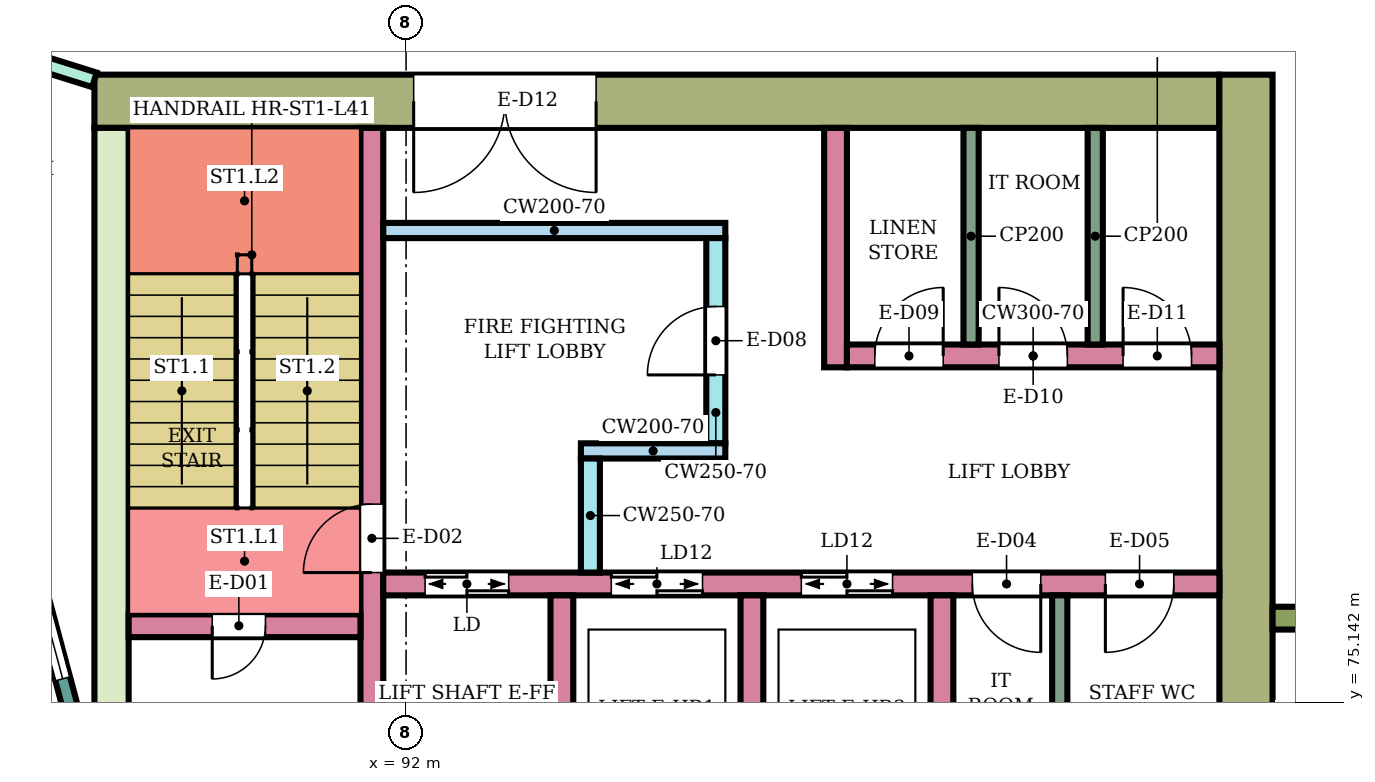
"""IFC4 building model, lengths in metres.
Left out: names, types, materials, properties, quantities, classifications, styles, units other than length and angle.
Written with IfcOpenShell. Run it as: python <this file> out.ifc"""

import sys

from ifc_helpers import new_model, si_unit, direction, frame, frame_2d, origin, place, context, subcontext, project, spatial, rectangle, extrude, element, fill, save


model = new_model("IFC4")
c1 = context("Model", 3, precision=1e-05, world=origin(), true_north=direction((0.0, 1.0)))
c2 = subcontext(c1, "Body", "Model", "MODEL_VIEW")
j1 = project(units=[si_unit("LENGTHUNIT", "METRE"), si_unit("PLANEANGLEUNIT", "RADIAN")], contexts=[c1])
p1 = place(None, origin())
s1 = spatial("IfcSite", under=j1, at=p1, CompositionType="ELEMENT")
p2 = place(p1, origin())
s2 = spatial("IfcBuilding", under=s1, at=p2, CompositionType="ELEMENT")
p3 = place(p2, frame((0.0, 0.0, 178.2)))
s3 = spatial("IfcBuildingStorey", under=s2, at=p3, CompositionType="ELEMENT", Elevation=178.2)
p4 = place(p3, frame((87.9, 83.05, 0.0), z_axis=(0.0, 0.0, 1.0), x_axis=(1.0, 0.0, 0.0)))
e1 = element("IfcWall", 1, at=p4, inside=s3, PredefinedType="SHEAR", context=c2, shape_type="SweptSolid", body=[
    extrude(rectangle(XDim=14.8, YDim=0.7, at=frame_2d((7.4, 0.0))), origin(), (0.0, 0.0, 1.0), 3.78),
])
p5 = place(p4, frame((4.2, 0.0, 0.0)))
e2 = element("IfcOpeningElement", 2, at=p5, cuts=e1, PredefinedType="OPENING", context=c2, shape_type="SweptSolid", body=[
    extrude(rectangle(XDim=2.4, YDim=2.4, at=frame_2d((1.2, 1.2))), frame((0.0, 0.36, 0.0), z_axis=(0.0, -1.0, 0.0), x_axis=(1.0, 0.0, 0.0)), (0.0, 0.0, 1.0), 0.72),
])
p6 = place(p3, frame((88.125, 75.0, 0.0), z_axis=(0.0, 0.0, 1.0), x_axis=(0.0, 1.0, 0.0)))
e3 = element("IfcWall", 3, at=p6, inside=s3, PredefinedType="SHEAR", context=c2, shape_type="SweptSolid", body=[
    extrude(rectangle(XDim=7.7, YDim=0.45, at=frame_2d((3.85, 0.0))), origin(), (0.0, 0.0, 1.0), 3.78),
])
p7 = place(p3, frame((103.05, 66.6, 0.0), z_axis=(0.0, 0.0, 1.0), x_axis=(0.0, 1.0, 0.0)))
e4 = element("IfcWall", 4, at=p7, inside=s3, PredefinedType="SHEAR", context=c2, shape_type="SweptSolid", body=[
    extrude(rectangle(XDim=16.8, YDim=0.7, at=frame_2d((8.4, 0.0))), origin(), (0.0, 0.0, 1.0), 3.78),
])
p8 = place(p3, frame((91.55, 75.0, 0.0), z_axis=(0.0, 0.0, 1.0), x_axis=(0.0, 1.0, 0.0)))
e5 = element("IfcWall", 5, at=p8, inside=s3, PredefinedType="SHEAR", context=c2, shape_type="SweptSolid", body=[
    extrude(rectangle(XDim=7.7, YDim=0.3, at=frame_2d((3.85, 0.0))), origin(), (0.0, 0.0, 1.0), 3.78),
])
p9 = place(p8, frame((1.85, 0.0, 0.0)))
e6 = element("IfcOpeningElement", 6, at=p9, cuts=e5, PredefinedType="OPENING", context=c2, shape_type="SweptSolid", body=[
    extrude(rectangle(XDim=0.9, YDim=2.1, at=frame_2d((0.45, 1.05))), frame((0.0, 0.16, 0.0), z_axis=(0.0, -1.0, 0.0), x_axis=(1.0, 0.0, 0.0)), (0.0, 0.0, 1.0), 0.32),
])
p10 = place(p3, frame((88.35, 76.15, 0.0), z_axis=(0.0, 0.0, 1.0), x_axis=(1.0, 0.0, 0.0)))
e7 = element("IfcWall", 7, at=p10, inside=s3, PredefinedType="SHEAR", context=c2, shape_type="SweptSolid", body=[
    extrude(rectangle(XDim=3.05, YDim=0.3, at=frame_2d((1.525, 0.0))), origin(), (0.0, 0.0, 1.0), 3.78),
])
p11 = place(p10, frame((1.1, 0.0, 0.0)))
e8 = element("IfcOpeningElement", 8, at=p11, cuts=e7, PredefinedType="OPENING", context=c2, shape_type="SweptSolid", body=[
    extrude(rectangle(XDim=0.7, YDim=2.0, at=frame_2d((0.35, 1.0))), frame((0.0, 0.16, 0.0), z_axis=(0.0, -1.0, 0.0), x_axis=(1.0, 0.0, 0.0)), (0.0, 0.0, 1.0), 0.32),
])
p12 = place(p3, frame((91.7, 76.7, 0.0), z_axis=(0.0, 0.0, 1.0), x_axis=(1.0, 0.0, 0.0)))
e9 = element("IfcWall", 9, at=p12, inside=s3, PredefinedType="SHEAR", context=c2, shape_type="SweptSolid", body=[
    extrude(rectangle(XDim=11.0, YDim=0.3, at=frame_2d((5.5, 0.0))), origin(), (0.0, 0.0, 1.0), 3.78),
])
p13 = place(p12, frame((0.55, 0.0, 0.0)))
e10 = element("IfcOpeningElement", 10, at=p13, cuts=e9, PredefinedType="OPENING", context=c2, shape_type="SweptSolid", body=[
    extrude(rectangle(XDim=1.1, YDim=2.1, at=frame_2d((0.55, 1.05))), frame((0.0, 0.16, 0.0), z_axis=(0.0, -1.0, 0.0), x_axis=(1.0, 0.0, 0.0)), (0.0, 0.0, 1.0), 0.32),
])
p14 = place(p12, frame((3.0, 0.0, 0.0)))
e11 = element("IfcOpeningElement", 11, at=p14, cuts=e9, PredefinedType="OPENING", context=c2, shape_type="SweptSolid", body=[
    extrude(rectangle(XDim=1.2, YDim=2.1, at=frame_2d((0.6, 1.05))), frame((0.0, 0.16, 0.0), z_axis=(0.0, -1.0, 0.0), x_axis=(1.0, 0.0, 0.0)), (0.0, 0.0, 1.0), 0.32),
])
p15 = place(p12, frame((5.5, 0.0, 0.0)))
e12 = element("IfcOpeningElement", 12, at=p15, cuts=e9, PredefinedType="OPENING", context=c2, shape_type="SweptSolid", body=[
    extrude(rectangle(XDim=1.2, YDim=2.1, at=frame_2d((0.6, 1.05))), frame((0.0, 0.16, 0.0), z_axis=(0.0, -1.0, 0.0), x_axis=(1.0, 0.0, 0.0)), (0.0, 0.0, 1.0), 0.32),
])
p16 = place(p12, frame((7.75, 0.0, 0.0)))
e13 = element("IfcOpeningElement", 13, at=p16, cuts=e9, PredefinedType="OPENING", context=c2, shape_type="SweptSolid", body=[
    extrude(rectangle(XDim=0.9, YDim=2.1, at=frame_2d((0.45, 1.05))), frame((0.0, 0.16, 0.0), z_axis=(0.0, -1.0, 0.0), x_axis=(1.0, 0.0, 0.0)), (0.0, 0.0, 1.0), 0.32),
])
p17 = place(p12, frame((9.5, 0.0, 0.0)))
e14 = element("IfcOpeningElement", 14, at=p17, cuts=e9, PredefinedType="OPENING", context=c2, shape_type="SweptSolid", body=[
    extrude(rectangle(XDim=0.9, YDim=2.1, at=frame_2d((0.45, 1.05))), frame((0.0, 0.16, 0.0), z_axis=(0.0, -1.0, 0.0), x_axis=(1.0, 0.0, 0.0)), (0.0, 0.0, 1.0), 0.32),
])
for number, where, z_axis, x_axis in (
    (15, (94.05, 74.0, 0.0), (0.0, 0.0, 1.0), (0.0, 1.0, 0.0)),
    (16, (96.55, 74.0, 0.0), (0.0, 0.0, 1.0), (0.0, 1.0, 0.0)),
    (17, (99.05, 74.0, 0.0), (0.0, 0.0, 1.0), (0.0, 1.0, 0.0)),
):
    element("IfcWall", number, at=place(p3, frame(where, z_axis=z_axis, x_axis=x_axis)), inside=s3, PredefinedType="SHEAR", context=c2, shape_type="SweptSolid", body=[
        extrude(rectangle(XDim=2.55, YDim=0.3, at=frame_2d((1.275, 0.0))), origin(), (0.0, 0.0, 1.0), 3.78),
    ])
p18 = place(p3, frame((91.7, 81.35, 0.0), z_axis=(0.0, 0.0, 1.0), x_axis=(1.0, 0.0, 0.0)))
e18 = element("IfcWall", 18, at=p18, inside=s3, PredefinedType="SHEAR", context=c2, shape_type="SweptSolid", body=[
    extrude(rectangle(XDim=4.5, YDim=0.2, at=frame_2d((2.25, 0.0))), origin(), (0.0, 0.0, 1.0), 3.78),
])
p19 = place(p3, frame((96.075, 78.55, 0.0), z_axis=(0.0, 0.0, 1.0), x_axis=(0.0, 1.0, 0.0)))
e19 = element("IfcWall", 19, at=p19, inside=s3, PredefinedType="SHEAR", context=c2, shape_type="SweptSolid", body=[
    extrude(rectangle(XDim=2.7, YDim=0.25, at=frame_2d((1.35, 0.0))), origin(), (0.0, 0.0, 1.0), 3.78),
])
p20 = place(p19, frame((0.9, 0.0, 0.0)))
e20 = element("IfcOpeningElement", 20, at=p20, cuts=e19, PredefinedType="OPENING", context=c2, shape_type="SweptSolid", body=[
    extrude(rectangle(XDim=0.9, YDim=2.1, at=frame_2d((0.45, 1.05))), frame((0.0, 0.135, 0.0), z_axis=(0.0, -1.0, 0.0), x_axis=(1.0, 0.0, 0.0)), (0.0, 0.0, 1.0), 0.27),
])
p21 = place(p3, frame((94.3, 78.45, 0.0), z_axis=(0.0, 0.0, 1.0), x_axis=(1.0, 0.0, 0.0)))
e21 = element("IfcWall", 21, at=p21, inside=s3, PredefinedType="SHEAR", context=c2, shape_type="SweptSolid", body=[
    extrude(rectangle(XDim=1.9, YDim=0.2, at=frame_2d((0.95, 0.0))), origin(), (0.0, 0.0, 1.0), 3.78),
])
p22 = place(p3, frame((94.425, 76.85, 0.0), z_axis=(0.0, 0.0, 1.0), x_axis=(0.0, 1.0, 0.0)))
e22 = element("IfcWall", 22, at=p22, inside=s3, PredefinedType="SHEAR", context=c2, shape_type="SweptSolid", body=[
    extrude(rectangle(XDim=1.5, YDim=0.25, at=frame_2d((0.75, 0.0))), origin(), (0.0, 0.0, 1.0), 3.78),
])
p23 = place(p3, frame((97.65, 79.55, 0.0), z_axis=(0.0, 0.0, 1.0), x_axis=(0.0, 1.0, 0.0)))
e23 = element("IfcWall", 23, at=p23, inside=s3, PredefinedType="SHEAR", context=c2, shape_type="SweptSolid", body=[
    extrude(rectangle(XDim=3.15, YDim=0.3, at=frame_2d((1.575, 0.0))), origin(), (0.0, 0.0, 1.0), 3.78),
])
p24 = place(p3, frame((97.8, 79.7, 0.0), z_axis=(0.0, 0.0, 1.0), x_axis=(1.0, 0.0, 0.0)))
e24 = element("IfcWall", 24, at=p24, inside=s3, PredefinedType="SHEAR", context=c2, shape_type="SweptSolid", body=[
    extrude(rectangle(XDim=4.9, YDim=0.3, at=frame_2d((2.45, 0.0))), origin(), (0.0, 0.0, 1.0), 3.78),
])
p25 = place(p24, frame((0.367, 0.0, 0.0)))
e25 = element("IfcOpeningElement", 25, at=p25, cuts=e24, PredefinedType="OPENING", context=c2, shape_type="SweptSolid", body=[
    extrude(rectangle(XDim=0.9, YDim=2.1, at=frame_2d((0.45, 1.05))), frame((0.0, 0.16, 0.0), z_axis=(0.0, -1.0, 0.0), x_axis=(1.0, 0.0, 0.0)), (0.0, 0.0, 1.0), 0.32),
])
p26 = place(p24, frame((2.0, 0.0, 0.0)))
e26 = element("IfcOpeningElement", 26, at=p26, cuts=e24, PredefinedType="OPENING", context=c2, shape_type="SweptSolid", body=[
    extrude(rectangle(XDim=0.9, YDim=2.1, at=frame_2d((0.45, 1.05))), frame((0.0, 0.16, 0.0), z_axis=(0.0, -1.0, 0.0), x_axis=(1.0, 0.0, 0.0)), (0.0, 0.0, 1.0), 0.32),
])
p27 = place(p24, frame((3.633, 0.0, 0.0)))
e27 = element("IfcOpeningElement", 27, at=p27, cuts=e24, PredefinedType="OPENING", context=c2, shape_type="SweptSolid", body=[
    extrude(rectangle(XDim=0.9, YDim=2.1, at=frame_2d((0.45, 1.05))), frame((0.0, 0.16, 0.0), z_axis=(0.0, -1.0, 0.0), x_axis=(1.0, 0.0, 0.0)), (0.0, 0.0, 1.0), 0.32),
])
p28 = place(p3, frame((103.4, 76.25, 0.0), z_axis=(0.0, 0.0, 1.0), x_axis=(1.0, 0.0, 0.0)))
e28 = element("IfcWall", 28, at=p28, inside=s3, PredefinedType="NOTDEFINED", context=c2, shape_type="SweptSolid", body=[
    extrude(rectangle(XDim=2.416, YDim=0.3, at=frame_2d((1.208, 0.0))), origin(), (0.0, 0.0, 1.0), 4.1),
])
p29 = place(p3, frame((87.604, 75.0, 0.0), z_axis=(0.0, 0.0, 1.0), x_axis=(-0.258789828301, 0.965933654434, 0.0)))
e29 = element("IfcWall", 29, at=p29, inside=s3, PredefinedType="NOTDEFINED", context=c2, shape_type="SweptSolid", body=[
    extrude(rectangle(XDim=3.936, YDim=0.2, at=frame_2d((1.968, 0.0))), origin(), (0.0, 0.0, 1.0), 4.1),
])
p30 = place(p29, frame((0.468, 0.0, 0.9)))
e30 = element("IfcOpeningElement", 30, at=p30, cuts=e29, PredefinedType="OPENING", context=c2, shape_type="SweptSolid", body=[
    extrude(rectangle(XDim=3.0, YDim=2.3, at=frame_2d((1.5, 1.15))), frame((0.0, 0.11, 0.0), z_axis=(0.0, -1.0, 0.0), x_axis=(1.0, 0.0, 0.0)), (0.0, 0.0, 1.0), 0.22),
])
p31 = place(p3, frame((85.587, 84.057, 0.0), z_axis=(0.0, 0.0, 1.0), x_axis=(0.954239513179, -0.299043393987, 0.0)))
e31 = element("IfcWall", 31, at=p31, inside=s3, PredefinedType="PARTITIONING", context=c2, shape_type="SweptSolid", body=[
    extrude(rectangle(XDim=2.424, YDim=0.2, at=frame_2d((1.212, 0.0))), origin(), (0.0, 0.0, 1.0), 3.65),
])
p32 = place(p31, frame((0.762, 0.0, 0.0)))
e32 = element("IfcOpeningElement", 32, at=p32, cuts=e31, PredefinedType="OPENING", context=c2, shape_type="SweptSolid", body=[
    extrude(rectangle(XDim=0.9, YDim=2.1, at=frame_2d((0.45, 1.05))), frame((0.0, 0.11, 0.0), z_axis=(0.0, -1.0, 0.0), x_axis=(1.0, 0.0, 0.0)), (0.0, 0.0, 1.0), 0.22),
])
p33 = place(p3, frame((100.6, 74.0, 0.0), z_axis=(0.0, 0.0, 1.0), x_axis=(0.0, 1.0, 0.0)))
e33 = element("IfcWall", 33, at=p33, inside=s3, PredefinedType="PARTITIONING", context=c2, shape_type="SweptSolid", body=[
    extrude(rectangle(XDim=2.55, YDim=0.2, at=frame_2d((1.275, 0.0))), origin(), (0.0, 0.0, 1.0), 3.78),
])
for number, where, z_axis, x_axis in (
    (34, (99.433, 79.85, 0.0), (0.0, 0.0, 1.0), (0.0, 1.0, 0.0)),
    (35, (101.067, 79.85, 0.0), (0.0, 0.0, 1.0), (0.0, 1.0, 0.0)),
):
    element("IfcWall", number, at=place(p3, frame(where, z_axis=z_axis, x_axis=x_axis)), inside=s3, PredefinedType="PARTITIONING", context=c2, shape_type="SweptSolid", body=[
        extrude(rectangle(XDim=2.85, YDim=0.2, at=frame_2d((1.425, 0.0))), origin(), (0.0, 0.0, 1.0), 3.78),
    ])
p34 = place(p30, origin())
e36 = element("IfcWindow", 36, at=p34, inside=s3, PartitioningType="SINGLE_PANEL", PredefinedType="WINDOW", context=c2, shape_type="SweptSolid", body=[
    extrude(rectangle(XDim=3.0, YDim=2.3, at=frame_2d((1.5, 1.15))), frame((0.0, 0.03, 0.0), z_axis=(0.0, -1.0, 0.0), x_axis=(1.0, 0.0, 0.0)), (0.0, 0.0, 1.0), 0.06),
])
fill(e30, e36)
p35 = place(p11, frame((0.7, 0.0, 0.0), z_axis=(0.0, 0.0, 1.0), x_axis=(-1.0, 0.0, 0.0)))
e37 = element("IfcDoor", 37, at=p35, inside=s3, OperationType="SINGLE_SWING_RIGHT", PredefinedType="DOOR", context=c2, shape_type="SweptSolid", body=[
    extrude(rectangle(XDim=0.7, YDim=2.0, at=frame_2d((0.35, 1.0))), frame((0.0, 0.025, 0.0), z_axis=(0.0, -1.0, 0.0), x_axis=(1.0, 0.0, 0.0)), (0.0, 0.0, 1.0), 0.05),
])
fill(e8, e37)
p36 = place(p9, origin())
e38 = element("IfcDoor", 38, at=p36, inside=s3, OperationType="SINGLE_SWING_LEFT", PredefinedType="DOOR", context=c2, shape_type="SweptSolid", body=[
    extrude(rectangle(XDim=0.9, YDim=2.1, at=frame_2d((0.45, 1.05))), frame((0.0, 0.025, 0.0), z_axis=(0.0, -1.0, 0.0), x_axis=(1.0, 0.0, 0.0)), (0.0, 0.0, 1.0), 0.05),
])
fill(e6, e38)
p37 = place(p13, origin())
e39 = element("IfcDoor", 39, at=p37, inside=s3, OperationType="DOUBLE_DOOR_SLIDING", PredefinedType="DOOR", context=c2, shape_type="SweptSolid", body=[
    extrude(rectangle(XDim=1.1, YDim=2.1, at=frame_2d((0.55, 1.05))), frame((0.0, 0.025, 0.0), z_axis=(0.0, -1.0, 0.0), x_axis=(1.0, 0.0, 0.0)), (0.0, 0.0, 1.0), 0.05),
])
fill(e10, e39)
p38 = place(p14, origin())
e40 = element("IfcDoor", 40, at=p38, inside=s3, OperationType="DOUBLE_DOOR_SLIDING", PredefinedType="DOOR", context=c2, shape_type="SweptSolid", body=[
    extrude(rectangle(XDim=1.2, YDim=2.1, at=frame_2d((0.6, 1.05))), frame((0.0, 0.025, 0.0), z_axis=(0.0, -1.0, 0.0), x_axis=(1.0, 0.0, 0.0)), (0.0, 0.0, 1.0), 0.05),
])
fill(e11, e40)
p39 = place(p15, origin())
e41 = element("IfcDoor", 41, at=p39, inside=s3, OperationType="DOUBLE_DOOR_SLIDING", PredefinedType="DOOR", context=c2, shape_type="SweptSolid", body=[
    extrude(rectangle(XDim=1.2, YDim=2.1, at=frame_2d((0.6, 1.05))), frame((0.0, 0.025, 0.0), z_axis=(0.0, -1.0, 0.0), x_axis=(1.0, 0.0, 0.0)), (0.0, 0.0, 1.0), 0.05),
])
fill(e12, e41)
p40 = place(p16, frame((0.9, 0.0, 0.0), z_axis=(0.0, 0.0, 1.0), x_axis=(-1.0, 0.0, 0.0)))
e42 = element("IfcDoor", 42, at=p40, inside=s3, OperationType="SINGLE_SWING_LEFT", PredefinedType="DOOR", context=c2, shape_type="SweptSolid", body=[
    extrude(rectangle(XDim=0.9, YDim=2.1, at=frame_2d((0.45, 1.05))), frame((0.0, 0.025, 0.0), z_axis=(0.0, -1.0, 0.0), x_axis=(1.0, 0.0, 0.0)), (0.0, 0.0, 1.0), 0.05),
])
fill(e13, e42)
p41 = place(p17, frame((0.9, 0.0, 0.0), z_axis=(0.0, 0.0, 1.0), x_axis=(-1.0, 0.0, 0.0)))
e43 = element("IfcDoor", 43, at=p41, inside=s3, OperationType="SINGLE_SWING_RIGHT", PredefinedType="DOOR", context=c2, shape_type="SweptSolid", body=[
    extrude(rectangle(XDim=0.9, YDim=2.1, at=frame_2d((0.45, 1.05))), frame((0.0, 0.025, 0.0), z_axis=(0.0, -1.0, 0.0), x_axis=(1.0, 0.0, 0.0)), (0.0, 0.0, 1.0), 0.05),
])
fill(e14, e43)
p42 = place(p20, origin())
e44 = element("IfcDoor", 44, at=p42, inside=s3, OperationType="SINGLE_SWING_LEFT", PredefinedType="DOOR", context=c2, shape_type="SweptSolid", body=[
    extrude(rectangle(XDim=0.9, YDim=2.1, at=frame_2d((0.45, 1.05))), frame((0.0, 0.025, 0.0), z_axis=(0.0, -1.0, 0.0), x_axis=(1.0, 0.0, 0.0)), (0.0, 0.0, 1.0), 0.05),
])
fill(e20, e44)
p43 = place(p25, origin())
e45 = element("IfcDoor", 45, at=p43, inside=s3, OperationType="SINGLE_SWING_RIGHT", PredefinedType="DOOR", context=c2, shape_type="SweptSolid", body=[
    extrude(rectangle(XDim=0.9, YDim=2.1, at=frame_2d((0.45, 1.05))), frame((0.0, 0.025, 0.0), z_axis=(0.0, -1.0, 0.0), x_axis=(1.0, 0.0, 0.0)), (0.0, 0.0, 1.0), 0.05),
])
fill(e25, e45)
p44 = place(p26, origin())
e46 = element("IfcDoor", 46, at=p44, inside=s3, OperationType="SINGLE_SWING_LEFT", PredefinedType="DOOR", context=c2, shape_type="SweptSolid", body=[
    extrude(rectangle(XDim=0.9, YDim=2.1, at=frame_2d((0.45, 1.05))), frame((0.0, 0.025, 0.0), z_axis=(0.0, -1.0, 0.0), x_axis=(1.0, 0.0, 0.0)), (0.0, 0.0, 1.0), 0.05),
])
fill(e26, e46)
p45 = place(p27, origin())
e47 = element("IfcDoor", 47, at=p45, inside=s3, OperationType="SINGLE_SWING_LEFT", PredefinedType="DOOR", context=c2, shape_type="SweptSolid", body=[
    extrude(rectangle(XDim=0.9, YDim=2.1, at=frame_2d((0.45, 1.05))), frame((0.0, 0.025, 0.0), z_axis=(0.0, -1.0, 0.0), x_axis=(1.0, 0.0, 0.0)), (0.0, 0.0, 1.0), 0.05),
])
fill(e27, e47)
p46 = place(p5, frame((2.4, 0.0, 0.0), z_axis=(0.0, 0.0, 1.0), x_axis=(-1.0, 0.0, 0.0)))
e48 = element("IfcDoor", 48, at=p46, inside=s3, OperationType="DOUBLE_DOOR_SINGLE_SWING", PredefinedType="DOOR", context=c2, shape_type="SweptSolid", body=[
    extrude(rectangle(XDim=2.4, YDim=2.4, at=frame_2d((1.2, 1.2))), frame((0.0, 0.025, 0.0), z_axis=(0.0, -1.0, 0.0), x_axis=(1.0, 0.0, 0.0)), (0.0, 0.0, 1.0), 0.05),
])
fill(e2, e48)
save(model, sys.argv[1])
